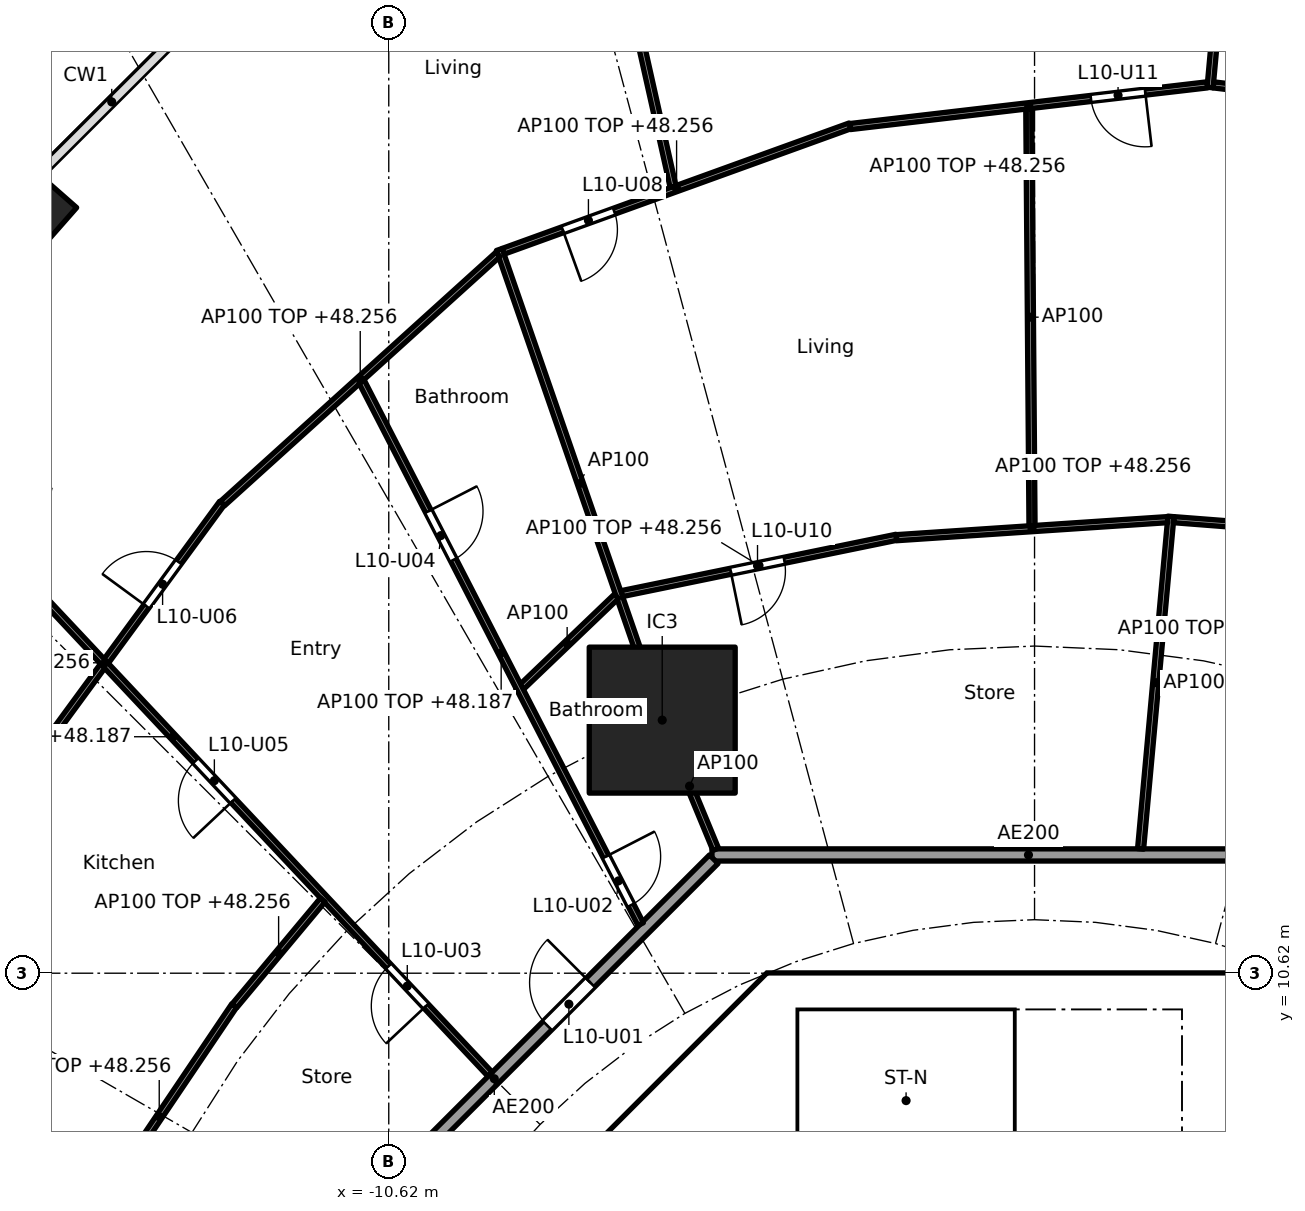
"""IFC4 building model, lengths in metres.
Left out: names, types, materials, properties, quantities, classifications, styles, units other than length and angle.
Written with IfcOpenShell. Run it as: python <this file> out.ifc"""

import sys

from ifc_helpers import new_model, si_unit, direction, frame, frame_2d, origin, origin_2d, place, context, subcontext, project, spatial, polyline, rectangle, hollow_rectangle, outline, extrude, element, fill, save


model = new_model("IFC4")
c1 = context("Model", 3, precision=1e-05, world=origin(), true_north=direction((0.0, 1.0)))
c2 = subcontext(c1, "Body", "Model", "MODEL_VIEW")
j1 = project(units=[si_unit("LENGTHUNIT", "METRE"), si_unit("PLANEANGLEUNIT", "RADIAN")], contexts=[c1])
p1 = place(None, origin())
s1 = spatial("IfcSite", under=j1, at=p1, CompositionType="ELEMENT")
p2 = place(p1, origin())
s2 = spatial("IfcBuilding", under=s1, at=p2, CompositionType="ELEMENT")
p3 = place(p2, frame((0.0, 0.0, 45.5)))
s3 = spatial("IfcBuildingStorey", under=s2, at=p3, CompositionType="ELEMENT", Elevation=45.5)
p4 = place(p3, frame((-16.552, 22.981, 0.0), z_axis=(0.0, 0.0, 1.0), x_axis=(-0.660114607735, -0.751164898445, 0.0)))
e1 = element("IfcColumn", 1, at=p4, inside=s3, PredefinedType="COLUMN", context=c2, shape_type="SweptSolid", body=[
    extrude(hollow_rectangle(XDim=1.4, YDim=0.9, WallThickness=0.05, at=origin_2d()), origin(), (0.0, 0.0, 1.0), 3.7),
])
p5 = place(p3, frame((-6.123, 14.782, 0.0), z_axis=(0.0, 0.0, 1.0), x_axis=(1.0, 0.0, 0.0)))
e2 = element("IfcColumn", 2, at=p5, inside=s3, PredefinedType="COLUMN", context=c2, shape_type="SweptSolid", body=[
    extrude(rectangle(XDim=2.4, YDim=2.4, at=origin_2d()), origin(), (0.0, 0.0, 1.0), 3.7),
])
p6 = place(p3, frame((-4.613, 9.988, 0.0), z_axis=(0.0, 0.0, 1.0), x_axis=(-0.707106781187, -0.707106781187, 0.0)))
e3 = element("IfcWall", 3, at=p6, inside=s3, PredefinedType="SHEAR", context=c2, shape_type="SweptSolid", body=[
    extrude(rectangle(XDim=7.602, YDim=0.6, at=frame_2d((3.801, 0.0))), origin(), (0.0, 0.0, 1.0), 3.44),
])
p7 = place(p6, frame((0.351, 0.0, 0.0)))
e4 = element("IfcOpeningElement", 4, at=p7, cuts=e3, PredefinedType="OPENING", context=c2, shape_type="SweptSolid", body=[
    extrude(rectangle(XDim=1.1, YDim=2.1, at=frame_2d((0.55, 1.05))), frame((0.0, 0.31, 0.0), z_axis=(0.0, -1.0, 0.0), x_axis=(1.0, 0.0, 0.0)), (0.0, 0.0, 1.0), 0.62),
])
p8 = place(p3, frame((-5.8, 4.3, 0.0), z_axis=(0.0, 0.0, 1.0), x_axis=(0.0, 1.0, 0.0)))
e5 = element("IfcWall", 5, at=p8, inside=s3, PredefinedType="PARTITIONING", context=c2, shape_type="SweptSolid", body=[
    extrude(rectangle(XDim=3.927, YDim=0.15, at=frame_2d((1.963, 0.0))), origin(), (0.0, 0.0, 1.0), 3.44),
])
p9 = place(p8, frame((1.551, 0.0, 0.0)))
e6 = element("IfcOpeningElement", 6, at=p9, cuts=e5, PredefinedType="OPENING", context=c2, shape_type="SweptSolid", body=[
    extrude(rectangle(XDim=0.9, YDim=2.1, at=frame_2d((0.45, 1.05))), frame((0.0, 0.085, 0.0), z_axis=(0.0, -1.0, 0.0), x_axis=(1.0, 0.0, 0.0)), (0.0, 0.0, 1.0), 0.17),
])
p10 = place(p3, origin())
e7 = element("IfcWall", 7, at=p10, inside=s3, PredefinedType="SHEAR", context=c2, shape_type="SweptSolid", body=[
    extrude(outline(polyline([(-4.152, 10.025), (-4.401, 9.776), (-4.825, 10.2), (-4.401, 10.625), (4.401, 10.625), (4.825, 10.2), (4.401, 9.776), (4.152, 10.025), (-4.152, 10.025)])), origin(), (0.0, 0.0, 1.0), 3.44),
])
p11 = place(p3, origin())
e8 = element("IfcWall", 8, at=p11, inside=s3, PredefinedType="SOLIDWALL", context=c2, shape_type="SweptSolid", body=[
    extrude(outline(polyline([(-3.9, 7.025), (-4.1, 7.025), (-4.1, 10.025), (-3.9, 10.025), (-3.9, 7.025)])), origin(), (0.0, 0.0, 1.0), 3.44),
])
p12 = place(p3, frame((-14.831, 6.135, 0.0), z_axis=(0.0, 0.0, 1.0), x_axis=(-0.969884949569, 0.243563512454, 0.0)))
e9 = element("IfcWall", 9, at=p12, inside=s3, PredefinedType="PARTITIONING", context=c2, shape_type="SweptSolid", body=[
    extrude(rectangle(XDim=8.829, YDim=0.2, at=frame_2d((4.415, 0.0))), origin(), (0.0, 0.0, 1.0), 2.756),
])
p13 = place(p3, frame((5.104, 12.565, 0.0), z_axis=(0.0, 0.0, 1.0), x_axis=(-1.0, 0.0, 0.0)))
e10 = element("IfcWall", 10, at=p13, inside=s3, PredefinedType="PARTITIONING", context=c2, shape_type="SweptSolid", body=[
    extrude(rectangle(XDim=10.409, YDim=0.2, at=frame_2d((5.205, 0.0))), origin(), (0.0, 0.0, 1.0), 3.44),
])
p14 = place(p3, frame((-5.275, 12.494, 0.0), z_axis=(0.0, 0.0, 1.0), x_axis=(-0.707106781187, -0.707106781187, 0.0)))
e11 = element("IfcWall", 11, at=p14, inside=s3, PredefinedType="PARTITIONING", context=c2, shape_type="SweptSolid", body=[
    extrude(rectangle(XDim=10.209, YDim=0.2, at=frame_2d((5.104, 0.0))), origin(), (0.0, 0.0, 1.0), 3.44),
])
p15 = place(p14, frame((2.87, 0.0, 0.0)))
e12 = element("IfcOpeningElement", 12, at=p15, cuts=e11, PredefinedType="OPENING", context=c2, shape_type="SweptSolid", body=[
    extrude(rectangle(XDim=1.0, YDim=2.1, at=frame_2d((0.5, 1.05))), frame((0.0, 0.11, 0.0), z_axis=(0.0, -1.0, 0.0), x_axis=(1.0, 0.0, 0.0)), (0.0, 0.0, 1.0), 0.22),
])
p16 = place(p3, frame((6.928, 17.719, 0.0), z_axis=(0.0, 0.0, 1.0), x_axis=(-0.997017959142, 0.077169872028, 0.0)))
e13 = element("IfcWall", 13, at=p16, inside=s3, PredefinedType="PARTITIONING", context=c2, shape_type="SweptSolid", body=[
    extrude(rectangle(XDim=4.654, YDim=0.1, at=frame_2d((2.327, 0.0))), origin(), (0.0, 0.0, 1.0), 2.756),
])
p17 = place(p16, frame((1.877, 0.0, 0.0)))
e14 = element("IfcOpeningElement", 14, at=p17, cuts=e13, PredefinedType="OPENING", context=c2, shape_type="SweptSolid", body=[
    extrude(rectangle(XDim=0.9, YDim=2.1, at=frame_2d((0.45, 1.05))), frame((0.0, 0.06, 0.0), z_axis=(0.0, -1.0, 0.0), x_axis=(1.0, 0.0, 0.0)), (0.0, 0.0, 1.0), 0.12),
])
p18 = place(p3, frame((8.907, 24.51, 0.0), z_axis=(0.0, 0.0, 1.0), x_axis=(-0.992836798252, 0.119478416615, 0.0)))
e15 = element("IfcWall", 15, at=p18, inside=s3, PredefinedType="PARTITIONING", context=c2, shape_type="SweptSolid", body=[
    extrude(rectangle(XDim=6.01, YDim=0.1, at=frame_2d((3.005, 0.0))), origin(), (0.0, 0.0, 1.0), 2.756),
])
p19 = place(p3, frame((1.744, 12.664, 0.0), z_axis=(0.0, 0.0, 1.0), x_axis=(0.090888552747, 0.995861070119, 0.0)))
e16 = element("IfcWall", 16, at=p19, inside=s3, PredefinedType="PARTITIONING", context=c2, shape_type="SweptSolid", body=[
    extrude(rectangle(XDim=5.49, YDim=0.1, at=frame_2d((2.745, 0.0))), origin(), (0.0, 0.0, 1.0), 2.687),
])
p20 = place(p3, frame((2.188, 18.079, 0.0), z_axis=(0.0, 0.0, 1.0), x_axis=(-0.997791437766, -0.066424744789, 0.0)))
e17 = element("IfcWall", 17, at=p20, inside=s3, PredefinedType="PARTITIONING", context=c2, shape_type="SweptSolid", body=[
    extrude(rectangle(XDim=4.469, YDim=0.1, at=frame_2d((2.235, 0.0))), origin(), (0.0, 0.0, 1.0), 2.756),
])
p21 = place(p3, frame((2.887, 25.185, 0.0), z_axis=(0.0, 0.0, 1.0), x_axis=(0.090885272046, 0.995861369531, 0.0)))
e18 = element("IfcWall", 18, at=p21, inside=s3, PredefinedType="PARTITIONING", context=c2, shape_type="SweptSolid", body=[
    extrude(rectangle(XDim=6.802, YDim=0.1, at=frame_2d((3.401, 0.0))), origin(), (0.0, 0.0, 1.0), 2.756),
])
p22 = place(p21, frame((2.976, 0.0, 0.0)))
e19 = element("IfcOpeningElement", 19, at=p22, cuts=e18, PredefinedType="OPENING", context=c2, shape_type="SweptSolid", body=[
    extrude(rectangle(XDim=0.9, YDim=2.1, at=frame_2d((0.45, 1.05))), frame((0.0, 0.06, 0.0), z_axis=(0.0, -1.0, 0.0), x_axis=(1.0, 0.0, 0.0)), (0.0, 0.0, 1.0), 0.12),
])
p23 = place(p3, frame((2.842, 25.229, 0.0), z_axis=(0.0, 0.0, 1.0), x_axis=(-0.993255612046, -0.115945198862, 0.0)))
e20 = element("IfcWall", 20, at=p23, inside=s3, PredefinedType="PARTITIONING", context=c2, shape_type="SweptSolid", body=[
    extrude(rectangle(XDim=5.913, YDim=0.1, at=frame_2d((2.956, 0.0))), origin(), (0.0, 0.0, 1.0), 2.756),
])
p24 = place(p23, frame((1.028, 0.0, 0.0)))
e21 = element("IfcOpeningElement", 21, at=p24, cuts=e20, PredefinedType="OPENING", context=c2, shape_type="SweptSolid", body=[
    extrude(rectangle(XDim=0.9, YDim=2.1, at=frame_2d((0.45, 1.05))), frame((0.0, 0.06, 0.0), z_axis=(0.0, -1.0, 0.0), x_axis=(1.0, 0.0, 0.0)), (0.0, 0.0, 1.0), 0.12),
])
p25 = place(p3, frame((-0.042, 17.98, 0.0), z_axis=(0.0, 0.0, 1.0), x_axis=(-0.007692080119, 0.999970415514, 0.0)))
e22 = element("IfcWall", 22, at=p25, inside=s3, PredefinedType="PARTITIONING", context=c2, shape_type="SweptSolid", body=[
    extrude(rectangle(XDim=6.856, YDim=0.1, at=frame_2d((3.428, 0.0))), origin(), (0.0, 0.0, 1.0), 3.44),
])
p26 = place(p3, frame((-2.272, 17.789, 0.0), z_axis=(0.0, 0.0, 1.0), x_axis=(-0.979587203416, -0.2010196779, 0.0)))
e23 = element("IfcWall", 23, at=p26, inside=s3, PredefinedType="PARTITIONING", context=c2, shape_type="SweptSolid", body=[
    extrude(rectangle(XDim=4.613, YDim=0.1, at=frame_2d((2.306, 0.0))), origin(), (0.0, 0.0, 1.0), 2.756),
])
p27 = place(p26, frame((1.881, 0.0, 0.0)))
e24 = element("IfcOpeningElement", 24, at=p27, cuts=e23, PredefinedType="OPENING", context=c2, shape_type="SweptSolid", body=[
    extrude(rectangle(XDim=0.9, YDim=2.1, at=frame_2d((0.45, 1.05))), frame((0.0, 0.06, 0.0), z_axis=(0.0, -1.0, 0.0), x_axis=(1.0, 0.0, 0.0)), (0.0, 0.0, 1.0), 0.12),
])
p28 = place(p3, frame((-3.034, 24.554, 0.0), z_axis=(0.0, 0.0, 1.0), x_axis=(-0.940401691072, -0.340065669288, 0.0)))
e25 = element("IfcWall", 25, at=p28, inside=s3, PredefinedType="PARTITIONING", context=c2, shape_type="SweptSolid", body=[
    extrude(rectangle(XDim=6.067, YDim=0.1, at=frame_2d((3.034, 0.0))), origin(), (0.0, 0.0, 1.0), 2.756),
])
p29 = place(p28, frame((4.125, 0.0, 0.0)))
e26 = element("IfcOpeningElement", 26, at=p29, cuts=e25, PredefinedType="OPENING", context=c2, shape_type="SweptSolid", body=[
    extrude(rectangle(XDim=0.9, YDim=2.1, at=frame_2d((0.45, 1.05))), frame((0.0, 0.06, 0.0), z_axis=(0.0, -1.0, 0.0), x_axis=(1.0, 0.0, 0.0)), (0.0, 0.0, 1.0), 0.12),
])
p30 = place(p3, frame((-5.945, 23.555, 0.0), z_axis=(0.0, 0.0, 1.0), x_axis=(-0.218598565433, 0.975814873421, 0.0)))
e27 = element("IfcWall", 27, at=p30, inside=s3, PredefinedType="PARTITIONING", context=c2, shape_type="SweptSolid", body=[
    extrude(rectangle(XDim=7.065, YDim=0.1, at=frame_2d((3.533, 0.0))), origin(), (0.0, 0.0, 1.0), 2.837),
])
p31 = place(p30, frame((3.083, 0.0, 0.0)))
e28 = element("IfcOpeningElement", 28, at=p31, cuts=e27, PredefinedType="OPENING", context=c2, shape_type="SweptSolid", body=[
    extrude(rectangle(XDim=0.9, YDim=2.1, at=frame_2d((0.45, 1.05))), frame((0.0, 0.06, 0.0), z_axis=(0.0, -1.0, 0.0), x_axis=(1.0, 0.0, 0.0)), (0.0, 0.0, 1.0), 0.12),
])
p32 = place(p3, frame((-5.243, 12.657, 0.0), z_axis=(0.0, 0.0, 1.0), x_axis=(-0.382719158442, 0.923864733477, 0.0)))
e29 = element("IfcWall", 29, at=p32, inside=s3, PredefinedType="PARTITIONING", context=c2, shape_type="SweptSolid", body=[
    extrude(rectangle(XDim=2.25, YDim=0.1, at=frame_2d((1.125, 0.0))), origin(), (0.0, 0.0, 1.0), 3.44),
])
p33 = place(p3, frame((-6.139, 14.829, 0.0), z_axis=(0.0, 0.0, 1.0), x_axis=(-0.327183700812, 0.944960753642, 0.0)))
e30 = element("IfcWall", 30, at=p33, inside=s3, PredefinedType="PARTITIONING", context=c2, shape_type="SweptSolid", body=[
    extrude(rectangle(XDim=8.14, YDim=0.1, at=frame_2d((4.07, 0.0))), origin(), (0.0, 0.0, 1.0), 3.44),
])
p34 = place(p3, frame((-6.876, 16.817, 0.0), z_axis=(0.0, 0.0, 1.0), x_axis=(-0.722762371977, -0.691096631199, 0.0)))
e31 = element("IfcWall", 31, at=p34, inside=s3, PredefinedType="PARTITIONING", context=c2, shape_type="SweptSolid", body=[
    extrude(rectangle(XDim=2.244, YDim=0.1, at=frame_2d((1.122, 0.0))), origin(), (0.0, 0.0, 1.0), 3.44),
])
p35 = place(p3, frame((-8.823, 22.441, 0.0), z_axis=(0.0, 0.0, 1.0), x_axis=(-0.741722263338, -0.670707152242, 0.0)))
e32 = element("IfcWall", 32, at=p35, inside=s3, PredefinedType="PARTITIONING", context=c2, shape_type="SweptSolid", body=[
    extrude(rectangle(XDim=6.109, YDim=0.1, at=frame_2d((3.055, 0.0))), origin(), (0.0, 0.0, 1.0), 2.756),
])
p36 = place(p3, frame((-6.477, 11.427, 0.0), z_axis=(0.0, 0.0, 1.0), x_axis=(-0.457464037982, 0.889228122561, 0.0)))
e33 = element("IfcWall", 33, at=p36, inside=s3, PredefinedType="PARTITIONING", context=c2, shape_type="SweptSolid", body=[
    extrude(rectangle(XDim=10.032, YDim=0.1, at=frame_2d((5.016, 0.0))), origin(), (0.0, 0.0, 1.0), 2.687),
])
p37 = place(p36, frame((0.35, 0.0, 0.0)))
e34 = element("IfcOpeningElement", 34, at=p37, cuts=e33, PredefinedType="OPENING", context=c2, shape_type="SweptSolid", body=[
    extrude(rectangle(XDim=0.9, YDim=2.1, at=frame_2d((0.45, 1.05))), frame((0.0, 0.06, 0.0), z_axis=(0.0, -1.0, 0.0), x_axis=(1.0, 0.0, 0.0)), (0.0, 0.0, 1.0), 0.12),
])
p38 = place(p36, frame((6.735, 0.0, 0.0)))
e35 = element("IfcOpeningElement", 35, at=p38, cuts=e33, PredefinedType="OPENING", context=c2, shape_type="SweptSolid", body=[
    extrude(rectangle(XDim=0.9, YDim=2.1, at=frame_2d((0.45, 1.05))), frame((0.0, 0.06, 0.0), z_axis=(0.0, -1.0, 0.0), x_axis=(1.0, 0.0, 0.0)), (0.0, 0.0, 1.0), 0.12),
])
p39 = place(p3, frame((-13.362, 18.35, 0.0), z_axis=(0.0, 0.0, 1.0), x_axis=(-0.591191311491, -0.806531359104, 0.0)))
e36 = element("IfcWall", 36, at=p39, inside=s3, PredefinedType="PARTITIONING", context=c2, shape_type="SweptSolid", body=[
    extrude(rectangle(XDim=6.51, YDim=0.1, at=frame_2d((3.255, 0.0))), origin(), (0.0, 0.0, 1.0), 2.756),
])
p40 = place(p39, frame((1.202, 0.0, 0.0)))
e37 = element("IfcOpeningElement", 37, at=p40, cuts=e36, PredefinedType="OPENING", context=c2, shape_type="SweptSolid", body=[
    extrude(rectangle(XDim=0.9, YDim=2.1, at=frame_2d((0.45, 1.05))), frame((0.0, 0.06, 0.0), z_axis=(0.0, -1.0, 0.0), x_axis=(1.0, 0.0, 0.0)), (0.0, 0.0, 1.0), 0.12),
])
p41 = place(p3, frame((-8.953, 8.958, 0.0), z_axis=(0.0, 0.0, 1.0), x_axis=(-0.684574307023, 0.728943082939, 0.0)))
e38 = element("IfcWall", 38, at=p41, inside=s3, PredefinedType="PARTITIONING", context=c2, shape_type="SweptSolid", body=[
    extrude(rectangle(XDim=15.231, YDim=0.1, at=frame_2d((7.615, 0.0))), origin(), (0.0, 0.0, 1.0), 2.687),
])
p42 = place(p41, frame((1.54, 0.0, 0.0)))
e39 = element("IfcOpeningElement", 39, at=p42, cuts=e38, PredefinedType="OPENING", context=c2, shape_type="SweptSolid", body=[
    extrude(rectangle(XDim=0.9, YDim=2.1, at=frame_2d((0.45, 1.05))), frame((0.0, 0.06, 0.0), z_axis=(0.0, -1.0, 0.0), x_axis=(1.0, 0.0, 0.0)), (0.0, 0.0, 1.0), 0.12),
])
p43 = place(p41, frame((6.174, 0.0, 0.0)))
e40 = element("IfcOpeningElement", 40, at=p43, cuts=e38, PredefinedType="OPENING", context=c2, shape_type="SweptSolid", body=[
    extrude(rectangle(XDim=0.9, YDim=2.1, at=frame_2d((0.45, 1.05))), frame((0.0, 0.06, 0.0), z_axis=(0.0, -1.0, 0.0), x_axis=(1.0, 0.0, 0.0)), (0.0, 0.0, 1.0), 0.12),
])
p44 = place(p41, frame((11.8, 0.0, 0.0)))
e41 = element("IfcOpeningElement", 41, at=p44, cuts=e38, PredefinedType="OPENING", context=c2, shape_type="SweptSolid", body=[
    extrude(rectangle(XDim=0.9, YDim=2.1, at=frame_2d((0.45, 1.05))), frame((0.0, 0.06, 0.0), z_axis=(0.0, -1.0, 0.0), x_axis=(1.0, 0.0, 0.0)), (0.0, 0.0, 1.0), 0.12),
])
p45 = place(p3, frame((-11.705, 11.825, 0.0), z_axis=(0.0, 0.0, 1.0), x_axis=(-0.640861724905, -0.767656335577, 0.0)))
e42 = element("IfcWall", 42, at=p45, inside=s3, PredefinedType="PARTITIONING", context=c2, shape_type="SweptSolid", body=[
    extrude(rectangle(XDim=2.268, YDim=0.1, at=frame_2d((1.134, 0.0))), origin(), (0.0, 0.0, 1.0), 2.756),
])
p46 = place(p3, frame((-13.162, 10.087, 0.0), z_axis=(0.0, 0.0, 1.0), x_axis=(-0.55912750241, -0.829081682375, 0.0)))
e43 = element("IfcWall", 43, at=p46, inside=s3, PredefinedType="PARTITIONING", context=c2, shape_type="SweptSolid", body=[
    extrude(rectangle(XDim=4.408, YDim=0.1, at=frame_2d((2.204, 0.0))), origin(), (0.0, 0.0, 1.0), 2.756),
])
p47 = place(p7, origin())
e44 = element("IfcDoor", 44, at=p47, inside=s3, OperationType="SINGLE_SWING_RIGHT", PredefinedType="DOOR", context=c2, shape_type="SweptSolid", body=[
    extrude(rectangle(XDim=1.1, YDim=2.1, at=frame_2d((0.55, 1.05))), frame((0.0, 0.025, 0.0), z_axis=(0.0, -1.0, 0.0), x_axis=(1.0, 0.0, 0.0)), (0.0, 0.0, 1.0), 0.05),
])
fill(e4, e44)
p48 = place(p15, frame((1.0, 0.0, 0.0), x_axis=(-1.0, 0.0, 0.0)))
e45 = element("IfcDoor", 45, at=p48, inside=s3, OperationType="SINGLE_SWING_RIGHT", PredefinedType="DOOR", context=c2, shape_type="SweptSolid", body=[
    extrude(rectangle(XDim=1.0, YDim=2.1, at=frame_2d((0.5, 1.05))), frame((0.0, 0.025, 0.0), z_axis=(0.0, -1.0, 0.0), x_axis=(1.0, 0.0, 0.0)), (0.0, 0.0, 1.0), 0.05),
])
fill(e12, e45)
p49 = place(p37, frame((0.9, 0.0, 0.0), x_axis=(-1.0, 0.0, 0.0)))
e46 = element("IfcDoor", 46, at=p49, inside=s3, OperationType="SINGLE_SWING_LEFT", PredefinedType="DOOR", context=c2, shape_type="SweptSolid", body=[
    extrude(rectangle(XDim=0.9, YDim=2.1, at=frame_2d((0.45, 1.05))), frame((0.0, 0.025, 0.0), z_axis=(0.0, -1.0, 0.0), x_axis=(1.0, 0.0, 0.0)), (0.0, 0.0, 1.0), 0.05),
])
fill(e34, e46)
p50 = place(p42, origin())
e47 = element("IfcDoor", 47, at=p50, inside=s3, OperationType="SINGLE_SWING_LEFT", PredefinedType="DOOR", context=c2, shape_type="SweptSolid", body=[
    extrude(rectangle(XDim=0.9, YDim=2.1, at=frame_2d((0.45, 1.05))), frame((0.0, 0.025, 0.0), z_axis=(0.0, -1.0, 0.0), x_axis=(1.0, 0.0, 0.0)), (0.0, 0.0, 1.0), 0.05),
])
fill(e39, e47)
p51 = place(p38, frame((0.9, 0.0, 0.0), x_axis=(-1.0, 0.0, 0.0)))
e48 = element("IfcDoor", 48, at=p51, inside=s3, OperationType="SINGLE_SWING_LEFT", PredefinedType="DOOR", context=c2, shape_type="SweptSolid", body=[
    extrude(rectangle(XDim=0.9, YDim=2.1, at=frame_2d((0.45, 1.05))), frame((0.0, 0.025, 0.0), z_axis=(0.0, -1.0, 0.0), x_axis=(1.0, 0.0, 0.0)), (0.0, 0.0, 1.0), 0.05),
])
fill(e35, e48)
p52 = place(p43, origin())
e49 = element("IfcDoor", 49, at=p52, inside=s3, OperationType="SINGLE_SWING_LEFT", PredefinedType="DOOR", context=c2, shape_type="SweptSolid", body=[
    extrude(rectangle(XDim=0.9, YDim=2.1, at=frame_2d((0.45, 1.05))), frame((0.0, 0.025, 0.0), z_axis=(0.0, -1.0, 0.0), x_axis=(1.0, 0.0, 0.0)), (0.0, 0.0, 1.0), 0.05),
])
fill(e40, e49)
p53 = place(p40, frame((0.9, 0.0, 0.0), x_axis=(-1.0, 0.0, 0.0)))
e50 = element("IfcDoor", 50, at=p53, inside=s3, OperationType="SINGLE_SWING_LEFT", PredefinedType="DOOR", context=c2, shape_type="SweptSolid", body=[
    extrude(rectangle(XDim=0.9, YDim=2.1, at=frame_2d((0.45, 1.05))), frame((0.0, 0.025, 0.0), z_axis=(0.0, -1.0, 0.0), x_axis=(1.0, 0.0, 0.0)), (0.0, 0.0, 1.0), 0.05),
])
fill(e37, e50)
p54 = place(p29, origin())
e51 = element("IfcDoor", 51, at=p54, inside=s3, OperationType="SINGLE_SWING_RIGHT", PredefinedType="DOOR", context=c2, shape_type="SweptSolid", body=[
    extrude(rectangle(XDim=0.9, YDim=2.1, at=frame_2d((0.45, 1.05))), frame((0.0, 0.025, 0.0), z_axis=(0.0, -1.0, 0.0), x_axis=(1.0, 0.0, 0.0)), (0.0, 0.0, 1.0), 0.05),
])
fill(e26, e51)
p55 = place(p27, origin())
e52 = element("IfcDoor", 52, at=p55, inside=s3, OperationType="SINGLE_SWING_RIGHT", PredefinedType="DOOR", context=c2, shape_type="SweptSolid", body=[
    extrude(rectangle(XDim=0.9, YDim=2.1, at=frame_2d((0.45, 1.05))), frame((0.0, 0.025, 0.0), z_axis=(0.0, -1.0, 0.0), x_axis=(1.0, 0.0, 0.0)), (0.0, 0.0, 1.0), 0.05),
])
fill(e24, e52)
p56 = place(p24, origin())
e53 = element("IfcDoor", 53, at=p56, inside=s3, OperationType="SINGLE_SWING_LEFT", PredefinedType="DOOR", context=c2, shape_type="SweptSolid", body=[
    extrude(rectangle(XDim=0.9, YDim=2.1, at=frame_2d((0.45, 1.05))), frame((0.0, 0.025, 0.0), z_axis=(0.0, -1.0, 0.0), x_axis=(1.0, 0.0, 0.0)), (0.0, 0.0, 1.0), 0.05),
])
fill(e21, e53)
save(model, sys.argv[1])
